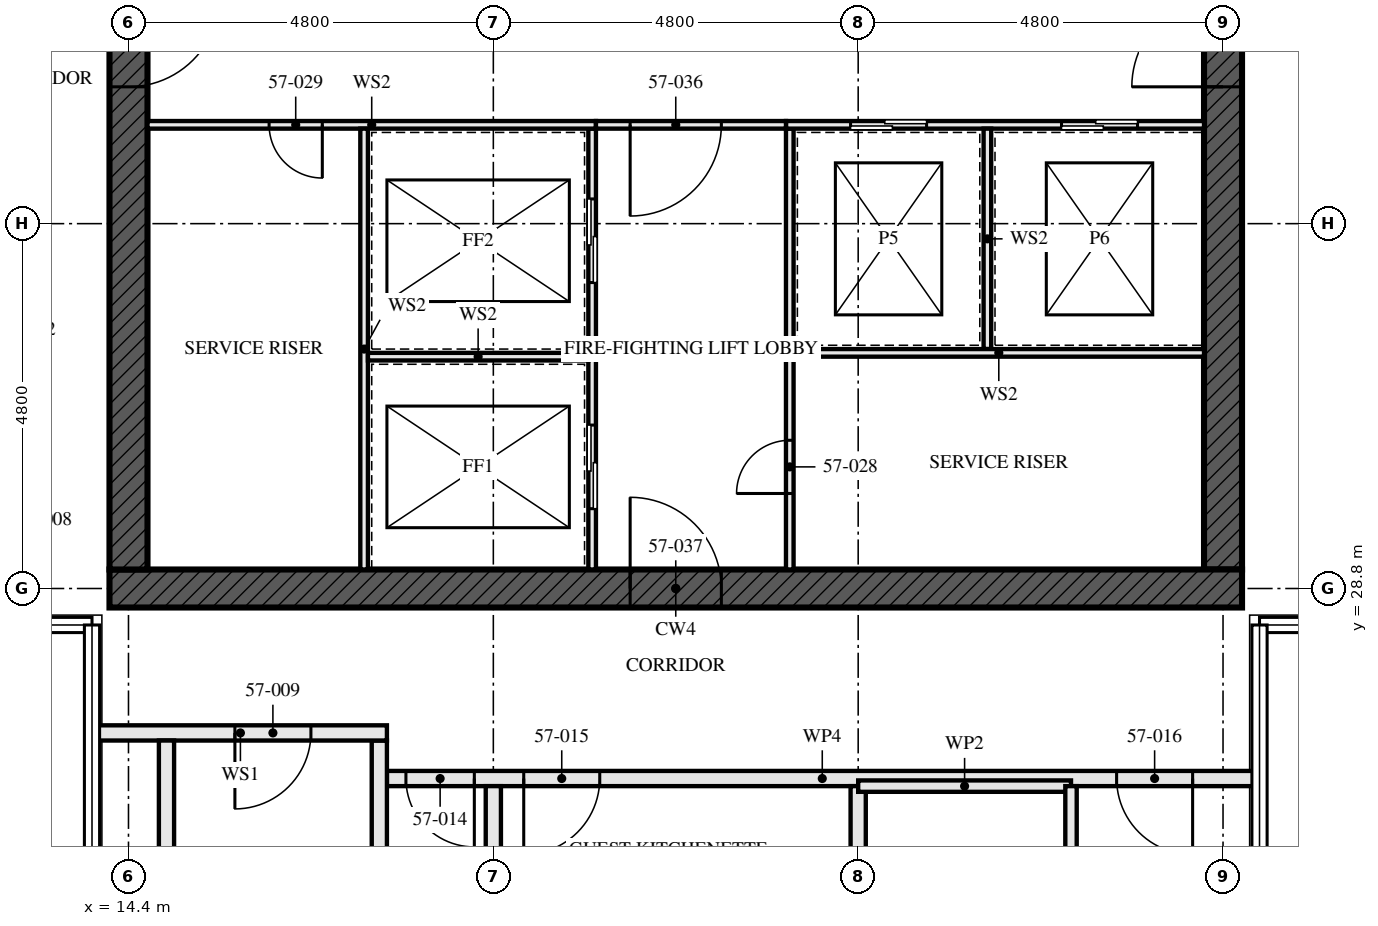
"""IFC4 building model, lengths in metres.
Left out: names, types, materials, properties, quantities, classifications, styles, units other than length and angle.
Written with IfcOpenShell. Run it as: python <this file> out.ifc"""

import sys

from ifc_helpers import new_model, si_unit, direction, frame, frame_2d, origin, place, context, subcontext, project, spatial, rectangle, extrude, element, fill, save


model = new_model("IFC4")
c1 = context("Model", 3, precision=1e-05, world=origin(), true_north=direction((0.0, 1.0)))
c2 = subcontext(c1, "Body", "Model", "MODEL_VIEW")
j1 = project(units=[si_unit("LENGTHUNIT", "METRE"), si_unit("PLANEANGLEUNIT", "RADIAN")], contexts=[c1])
p1 = place(None, origin())
s1 = spatial("IfcSite", under=j1, at=p1, CompositionType="ELEMENT")
p2 = place(p1, origin())
s2 = spatial("IfcBuilding", under=s1, at=p2, CompositionType="ELEMENT")
p3 = place(p2, frame((0.0, 0.0, 208.5)))
s3 = spatial("IfcBuildingStorey", under=s2, at=p3, CompositionType="ELEMENT", Elevation=208.5)
p4 = place(p3, frame((14.15, 28.8, -0.17), z_axis=(0.0, 0.0, 1.0), x_axis=(1.0, 0.0, 0.0)))
e1 = element("IfcWall", 1, at=p4, inside=s3, PredefinedType="SHEAR", context=c2, shape_type="SweptSolid", body=[
    extrude(rectangle(XDim=14.9, YDim=0.5, at=frame_2d((7.45, 0.0))), origin(), (0.0, 0.0, 1.0), 3.5),
])
p5 = place(p4, frame((6.85, 0.0, 0.17)))
e2 = element("IfcOpeningElement", 2, at=p5, cuts=e1, PredefinedType="OPENING", context=c2, shape_type="SweptSolid", body=[
    extrude(rectangle(XDim=1.2, YDim=2.1, at=frame_2d((0.6, 1.05))), frame((0.0, 0.26, 0.0), z_axis=(0.0, -1.0, 0.0), x_axis=(1.0, 0.0, 0.0)), (0.0, 0.0, 1.0), 0.521),
])
p6 = place(p3, frame((14.4, 42.95, -0.17), z_axis=(0.0, 0.0, 1.0), x_axis=(0.0, -1.0, 0.0)))
e3 = element("IfcWall", 3, at=p6, inside=s3, PredefinedType="SHEAR", context=c2, shape_type="SweptSolid", body=[
    extrude(rectangle(XDim=13.9, YDim=0.5, at=frame_2d((6.95, 0.0))), origin(), (0.0, 0.0, 1.0), 3.5),
])
p7 = place(p6, frame((6.35, 0.0, 0.17)))
e4 = element("IfcOpeningElement", 4, at=p7, cuts=e3, PredefinedType="OPENING", context=c2, shape_type="SweptSolid", body=[
    extrude(rectangle(XDim=1.2, YDim=2.1, at=frame_2d((0.6, 1.05))), frame((0.0, 0.26, 0.0), z_axis=(0.0, -1.0, 0.0), x_axis=(1.0, 0.0, 0.0)), (0.0, 0.0, 1.0), 0.521),
])
p8 = place(p3, frame((28.8, 29.05, -0.17), z_axis=(0.0, 0.0, 1.0), x_axis=(0.0, 1.0, 0.0)))
e5 = element("IfcWall", 5, at=p8, inside=s3, PredefinedType="SHEAR", context=c2, shape_type="SweptSolid", body=[
    extrude(rectangle(XDim=13.9, YDim=0.5, at=frame_2d((6.95, 0.0))), origin(), (0.0, 0.0, 1.0), 3.5),
])
p9 = place(p8, frame((6.35, 0.0, 0.17)))
e6 = element("IfcOpeningElement", 6, at=p9, cuts=e5, PredefinedType="OPENING", context=c2, shape_type="SweptSolid", body=[
    extrude(rectangle(XDim=1.2, YDim=2.1, at=frame_2d((0.6, 1.05))), frame((0.0, 0.26, 0.0), z_axis=(0.0, -1.0, 0.0), x_axis=(1.0, 0.0, 0.0)), (0.0, 0.0, 1.0), 0.521),
])
for number, where, z_axis, x_axis in (
    (7, (14.9, 22.1, 0.0), (0.0, 0.0, 1.0), (0.0, 1.0, 0.0)),
    (8, (17.7, 22.1, 0.0), (0.0, 0.0, 1.0), (0.0, 1.0, 0.0)),
):
    element("IfcWall", number, at=place(p3, frame(where, z_axis=z_axis, x_axis=x_axis)), inside=s3, PredefinedType="SOLIDWALL", context=c2, shape_type="SweptSolid", body=[
        extrude(rectangle(XDim=4.7, YDim=0.2, at=frame_2d((2.35, 0.0))), origin(), (0.0, 0.0, 1.0), 2.99),
    ])
p10 = place(p3, frame((13.945, 26.9, 0.0), z_axis=(0.0, 0.0, 1.0), x_axis=(1.0, 0.0, 0.0)))
e9 = element("IfcWall", 9, at=p10, inside=s3, PredefinedType="SOLIDWALL", context=c2, shape_type="SweptSolid", body=[
    extrude(rectangle(XDim=3.855, YDim=0.2, at=frame_2d((1.927, 0.0))), origin(), (0.0, 0.0, 1.0), 2.32),
])
p11 = place(p10, frame((1.855, 0.0, 0.0)))
e10 = element("IfcOpeningElement", 10, at=p11, cuts=e9, PredefinedType="OPENING", context=c2, shape_type="SweptSolid", body=[
    extrude(rectangle(XDim=1.0, YDim=2.1, at=frame_2d((0.5, 1.05))), frame((0.0, 0.111, 0.0), z_axis=(0.0, -1.0, 0.0), x_axis=(1.0, 0.0, 0.0)), (0.0, 0.0, 1.0), 0.221),
])
for number, where, z_axis, x_axis in (
    (11, (19.2, 19.52, 0.0), (0.0, 0.0, 1.0), (0.0, 1.0, 0.0)),
    (12, (24.0, 19.52, 0.0), (0.0, 0.0, 1.0), (0.0, 1.0, 0.0)),
):
    element("IfcWall", number, at=place(p3, frame(where, z_axis=z_axis, x_axis=x_axis)), inside=s3, PredefinedType="PARTITIONING", context=c2, shape_type="SweptSolid", body=[
        extrude(rectangle(XDim=6.68, YDim=0.2, at=frame_2d((3.34, 0.0))), origin(), (0.0, 0.0, 1.0), 2.55),
    ])
p12 = place(p3, frame((26.8, 23.2, 0.0), z_axis=(0.0, 0.0, 1.0), x_axis=(0.0, 1.0, 0.0)))
e13 = element("IfcWall", 13, at=p12, inside=s3, PredefinedType="PARTITIONING", context=c2, shape_type="SweptSolid", body=[
    extrude(rectangle(XDim=3.0, YDim=0.15, at=frame_2d((1.5, 0.0))), origin(), (0.0, 0.0, 1.0), 2.55),
])
p13 = place(p12, frame((1.05, 0.0, 0.0)))
e14 = element("IfcOpeningElement", 14, at=p13, cuts=e13, PredefinedType="OPENING", context=c2, shape_type="SweptSolid", body=[
    extrude(rectangle(XDim=0.9, YDim=2.1, at=frame_2d((0.45, 1.05))), frame((0.0, 0.085, 0.0), z_axis=(0.0, -1.0, 0.0), x_axis=(1.0, 0.0, 0.0)), (0.0, 0.0, 1.0), 0.171),
])
p14 = place(p3, frame((24.0, 26.2, 0.0), z_axis=(0.0, 0.0, 1.0), x_axis=(1.0, 0.0, 0.0)))
e15 = element("IfcWall", 15, at=p14, inside=s3, PredefinedType="PARTITIONING", context=c2, shape_type="SweptSolid", body=[
    extrude(rectangle(XDim=2.8, YDim=0.15, at=frame_2d((1.4, 0.0))), origin(), (0.0, 0.0, 1.0), 3.33),
])
p15 = place(p3, frame((17.8, 26.3, 0.0), z_axis=(0.0, 0.0, 1.0), x_axis=(1.0, 0.0, 0.0)))
e16 = element("IfcWall", 16, at=p15, inside=s3, PredefinedType="PARTITIONING", context=c2, shape_type="SweptSolid", body=[
    extrude(rectangle(XDim=11.455, YDim=0.2, at=frame_2d((5.728, 0.0))), origin(), (0.0, 0.0, 1.0), 2.32),
])
p16 = place(p15, frame((0.25, 0.0, 0.0)))
e17 = element("IfcOpeningElement", 17, at=p16, cuts=e16, PredefinedType="OPENING", context=c2, shape_type="SweptSolid", body=[
    extrude(rectangle(XDim=0.9, YDim=2.1, at=frame_2d((0.45, 1.05))), frame((0.0, 0.111, 0.0), z_axis=(0.0, -1.0, 0.0), x_axis=(1.0, 0.0, 0.0)), (0.0, 0.0, 1.0), 0.221),
])
p17 = place(p15, frame((1.8, 0.0, 0.0)))
e18 = element("IfcOpeningElement", 18, at=p17, cuts=e16, PredefinedType="OPENING", context=c2, shape_type="SweptSolid", body=[
    extrude(rectangle(XDim=1.0, YDim=2.1, at=frame_2d((0.5, 1.05))), frame((0.0, 0.111, 0.0), z_axis=(0.0, -1.0, 0.0), x_axis=(1.0, 0.0, 0.0)), (0.0, 0.0, 1.0), 0.221),
])
p18 = place(p15, frame((9.6, 0.0, 0.0)))
e19 = element("IfcOpeningElement", 19, at=p18, cuts=e16, PredefinedType="OPENING", context=c2, shape_type="SweptSolid", body=[
    extrude(rectangle(XDim=1.0, YDim=2.1, at=frame_2d((0.5, 1.05))), frame((0.0, 0.111, 0.0), z_axis=(0.0, -1.0, 0.0), x_axis=(1.0, 0.0, 0.0)), (0.0, 0.0, 1.0), 0.221),
])
p19 = place(p3, frame((20.5, 29.05, 0.0), z_axis=(0.0, 0.0, 1.0), x_axis=(0.0, 1.0, 0.0)))
e20 = element("IfcWall", 20, at=p19, inside=s3, PredefinedType="SOLIDWALL", context=c2, shape_type="SweptSolid", body=[
    extrude(rectangle(XDim=5.8, YDim=0.1, at=frame_2d((2.9, 0.0))), origin(), (0.0, 0.0, 1.0), 3.33),
])
p20 = place(p19, frame((0.8, 0.0, 0.0)))
e21 = element("IfcOpeningElement", 21, at=p20, cuts=e20, PredefinedType="OPENING", context=c2, shape_type="SweptSolid", body=[
    extrude(rectangle(XDim=1.1, YDim=2.3, at=frame_2d((0.55, 1.15))), frame((0.0, 0.061, 0.0), z_axis=(0.0, -1.0, 0.0), x_axis=(1.0, 0.0, 0.0)), (0.0, 0.0, 1.0), 0.121),
])
p21 = place(p19, frame((3.775, 0.0, 0.0)))
e22 = element("IfcOpeningElement", 22, at=p21, cuts=e20, PredefinedType="OPENING", context=c2, shape_type="SweptSolid", body=[
    extrude(rectangle(XDim=1.1, YDim=2.3, at=frame_2d((0.55, 1.15))), frame((0.0, 0.061, 0.0), z_axis=(0.0, -1.0, 0.0), x_axis=(1.0, 0.0, 0.0)), (0.0, 0.0, 1.0), 0.121),
])
p22 = place(p3, frame((23.1, 29.05, 0.0), z_axis=(0.0, 0.0, 1.0), x_axis=(0.0, 1.0, 0.0)))
e23 = element("IfcWall", 23, at=p22, inside=s3, PredefinedType="SOLIDWALL", context=c2, shape_type="SweptSolid", body=[
    extrude(rectangle(XDim=5.8, YDim=0.1, at=frame_2d((2.9, 0.0))), origin(), (0.0, 0.0, 1.0), 3.33),
])
p23 = place(p22, frame((1.0, 0.0, 0.0)))
e24 = element("IfcOpeningElement", 24, at=p23, cuts=e23, PredefinedType="OPENING", context=c2, shape_type="SweptSolid", body=[
    extrude(rectangle(XDim=0.7, YDim=2.1, at=frame_2d((0.35, 1.05))), frame((0.0, 0.061, 0.0), z_axis=(0.0, -1.0, 0.0), x_axis=(1.0, 0.0, 0.0)), (0.0, 0.0, 1.0), 0.121),
])
p24 = place(p3, frame((14.65, 34.9, 0.0), z_axis=(0.0, 0.0, 1.0), x_axis=(1.0, 0.0, 0.0)))
e25 = element("IfcWall", 25, at=p24, inside=s3, PredefinedType="SOLIDWALL", context=c2, shape_type="SweptSolid", body=[
    extrude(rectangle(XDim=5.9, YDim=0.1, at=frame_2d((2.95, 0.0))), origin(), (0.0, 0.0, 1.0), 3.33),
])
p25 = place(p24, frame((1.6, 0.0, 0.0)))
e26 = element("IfcOpeningElement", 26, at=p25, cuts=e25, PredefinedType="OPENING", context=c2, shape_type="SweptSolid", body=[
    extrude(rectangle(XDim=0.7, YDim=2.1, at=frame_2d((0.35, 1.05))), frame((0.0, 0.061, 0.0), z_axis=(0.0, -1.0, 0.0), x_axis=(1.0, 0.0, 0.0)), (0.0, 0.0, 1.0), 0.121),
])
p26 = place(p3, frame((23.05, 34.9, 0.0), z_axis=(0.0, 0.0, 1.0), x_axis=(1.0, 0.0, 0.0)))
e27 = element("IfcWall", 27, at=p26, inside=s3, PredefinedType="SOLIDWALL", context=c2, shape_type="SweptSolid", body=[
    extrude(rectangle(XDim=5.5, YDim=0.1, at=frame_2d((2.75, 0.0))), origin(), (0.0, 0.0, 1.0), 3.33),
])
p27 = place(p26, frame((0.85, 0.0, 0.0)))
e28 = element("IfcOpeningElement", 28, at=p27, cuts=e27, PredefinedType="OPENING", context=c2, shape_type="SweptSolid", body=[
    extrude(rectangle(XDim=1.0, YDim=2.1, at=frame_2d((0.5, 1.05))), frame((0.0, 0.061, 0.0), z_axis=(0.0, -1.0, 0.0), x_axis=(1.0, 0.0, 0.0)), (0.0, 0.0, 1.0), 0.121),
])
p28 = place(p26, frame((3.625, 0.0, 0.0)))
e29 = element("IfcOpeningElement", 29, at=p28, cuts=e27, PredefinedType="OPENING", context=c2, shape_type="SweptSolid", body=[
    extrude(rectangle(XDim=1.0, YDim=2.1, at=frame_2d((0.5, 1.05))), frame((0.0, 0.061, 0.0), z_axis=(0.0, -1.0, 0.0), x_axis=(1.0, 0.0, 0.0)), (0.0, 0.0, 1.0), 0.121),
])
p29 = place(p3, frame((20.55, 34.9, 0.0), z_axis=(0.0, 0.0, 1.0), x_axis=(1.0, 0.0, 0.0)))
e30 = element("IfcWall", 30, at=p29, inside=s3, PredefinedType="SOLIDWALL", context=c2, shape_type="SweptSolid", body=[
    extrude(rectangle(XDim=2.5, YDim=0.1, at=frame_2d((1.25, 0.0))), origin(), (0.0, 0.0, 1.0), 3.33),
])
p30 = place(p29, frame((0.45, 0.0, 0.0)))
e31 = element("IfcOpeningElement", 31, at=p30, cuts=e30, PredefinedType="OPENING", context=c2, shape_type="SweptSolid", body=[
    extrude(rectangle(XDim=1.2, YDim=2.1, at=frame_2d((0.6, 1.05))), frame((0.0, 0.061, 0.0), z_axis=(0.0, -1.0, 0.0), x_axis=(1.0, 0.0, 0.0)), (0.0, 0.0, 1.0), 0.121),
])
p31 = place(p3, frame((17.5, 29.05, 0.0), z_axis=(0.0, 0.0, 1.0), x_axis=(0.0, 1.0, 0.0)))
e32 = element("IfcWall", 32, at=p31, inside=s3, PredefinedType="SOLIDWALL", context=c2, shape_type="SweptSolid", body=[
    extrude(rectangle(XDim=5.8, YDim=0.1, at=frame_2d((2.9, 0.0))), origin(), (0.0, 0.0, 1.0), 3.33),
])
p32 = place(p3, frame((17.55, 31.85, 0.0), z_axis=(0.0, 0.0, 1.0), x_axis=(1.0, 0.0, 0.0)))
e33 = element("IfcWall", 33, at=p32, inside=s3, PredefinedType="SOLIDWALL", context=c2, shape_type="SweptSolid", body=[
    extrude(rectangle(XDim=2.9, YDim=0.1, at=frame_2d((1.45, 0.0))), origin(), (0.0, 0.0, 1.0), 3.33),
])
p33 = place(p3, frame((25.7, 31.95, 0.0), z_axis=(0.0, 0.0, 1.0), x_axis=(0.0, 1.0, 0.0)))
e34 = element("IfcWall", 34, at=p33, inside=s3, PredefinedType="SOLIDWALL", context=c2, shape_type="SweptSolid", body=[
    extrude(rectangle(XDim=2.9, YDim=0.1, at=frame_2d((1.45, 0.0))), origin(), (0.0, 0.0, 1.0), 3.33),
])
p34 = place(p3, frame((23.15, 31.9, 0.0), z_axis=(0.0, 0.0, 1.0), x_axis=(1.0, 0.0, 0.0)))
e35 = element("IfcWall", 35, at=p34, inside=s3, PredefinedType="SOLIDWALL", context=c2, shape_type="SweptSolid", body=[
    extrude(rectangle(XDim=5.4, YDim=0.1, at=frame_2d((2.7, 0.0))), origin(), (0.0, 0.0, 1.0), 3.33),
])
p35 = place(p11, frame((1.0, 0.0, 0.0), z_axis=(0.0, 0.0, 1.0), x_axis=(-1.0, 0.0, 0.0)))
e36 = element("IfcDoor", 36, at=p35, inside=s3, OperationType="SINGLE_SWING_LEFT", PredefinedType="DOOR", context=c2, shape_type="SweptSolid", body=[
    extrude(rectangle(XDim=1.0, YDim=2.1, at=frame_2d((0.5, 1.05))), frame((0.0, 0.032, 0.0), z_axis=(0.0, -1.0, 0.0), x_axis=(1.0, 0.0, 0.0)), (0.0, 0.0, 1.0), 0.064),
])
fill(e10, e36)
p36 = place(p16, frame((0.9, 0.0, 0.0), z_axis=(0.0, 0.0, 1.0), x_axis=(-1.0, 0.0, 0.0)))
e37 = element("IfcDoor", 37, at=p36, inside=s3, OperationType="SINGLE_SWING_RIGHT", PredefinedType="DOOR", context=c2, shape_type="SweptSolid", body=[
    extrude(rectangle(XDim=0.9, YDim=2.1, at=frame_2d((0.45, 1.05))), frame((0.0, 0.027, 0.0), z_axis=(0.0, -1.0, 0.0), x_axis=(1.0, 0.0, 0.0)), (0.0, 0.0, 1.0), 0.054),
])
fill(e17, e37)
p37 = place(p17, frame((1.0, 0.0, 0.0), z_axis=(0.0, 0.0, 1.0), x_axis=(-1.0, 0.0, 0.0)))
e38 = element("IfcDoor", 38, at=p37, inside=s3, OperationType="SINGLE_SWING_LEFT", PredefinedType="DOOR", context=c2, shape_type="SweptSolid", body=[
    extrude(rectangle(XDim=1.0, YDim=2.1, at=frame_2d((0.5, 1.05))), frame((0.0, 0.027, 0.0), z_axis=(0.0, -1.0, 0.0), x_axis=(1.0, 0.0, 0.0)), (0.0, 0.0, 1.0), 0.054),
])
fill(e18, e38)
p38 = place(p18, frame((1.0, 0.0, 0.0), z_axis=(0.0, 0.0, 1.0), x_axis=(-1.0, 0.0, 0.0)))
e39 = element("IfcDoor", 39, at=p38, inside=s3, OperationType="SINGLE_SWING_RIGHT", PredefinedType="DOOR", context=c2, shape_type="SweptSolid", body=[
    extrude(rectangle(XDim=1.0, YDim=2.1, at=frame_2d((0.5, 1.05))), frame((0.0, 0.027, 0.0), z_axis=(0.0, -1.0, 0.0), x_axis=(1.0, 0.0, 0.0)), (0.0, 0.0, 1.0), 0.054),
])
fill(e19, e39)
p39 = place(p20, origin())
e40 = element("IfcDoor", 40, at=p39, inside=s3, OperationType="SLIDING_TO_LEFT", PredefinedType="DOOR", context=c2, shape_type="SweptSolid", body=[
    extrude(rectangle(XDim=1.1, YDim=2.3, at=frame_2d((0.55, 1.15))), frame((0.0, 0.05, 0.0), z_axis=(0.0, -1.0, 0.0), x_axis=(1.0, 0.0, 0.0)), (0.0, 0.0, 1.0), 0.1),
])
fill(e21, e40)
p40 = place(p21, origin())
e41 = element("IfcDoor", 41, at=p40, inside=s3, OperationType="SLIDING_TO_LEFT", PredefinedType="DOOR", context=c2, shape_type="SweptSolid", body=[
    extrude(rectangle(XDim=1.1, YDim=2.3, at=frame_2d((0.55, 1.15))), frame((0.0, 0.05, 0.0), z_axis=(0.0, -1.0, 0.0), x_axis=(1.0, 0.0, 0.0)), (0.0, 0.0, 1.0), 0.1),
])
fill(e22, e41)
p41 = place(p23, origin())
e42 = element("IfcDoor", 42, at=p41, inside=s3, OperationType="SINGLE_SWING_RIGHT", PredefinedType="DOOR", context=c2, shape_type="SweptSolid", body=[
    extrude(rectangle(XDim=0.7, YDim=2.1, at=frame_2d((0.35, 1.05))), frame((0.0, 0.027, 0.0), z_axis=(0.0, -1.0, 0.0), x_axis=(1.0, 0.0, 0.0)), (0.0, 0.0, 1.0), 0.054),
])
fill(e24, e42)
p42 = place(p25, frame((0.7, 0.0, 0.0), z_axis=(0.0, 0.0, 1.0), x_axis=(-1.0, 0.0, 0.0)))
e43 = element("IfcDoor", 43, at=p42, inside=s3, OperationType="SINGLE_SWING_RIGHT", PredefinedType="DOOR", context=c2, shape_type="SweptSolid", body=[
    extrude(rectangle(XDim=0.7, YDim=2.1, at=frame_2d((0.35, 1.05))), frame((0.0, 0.027, 0.0), z_axis=(0.0, -1.0, 0.0), x_axis=(1.0, 0.0, 0.0)), (0.0, 0.0, 1.0), 0.054),
])
fill(e26, e43)
p43 = place(p27, origin())
e44 = element("IfcDoor", 44, at=p43, inside=s3, OperationType="SLIDING_TO_LEFT", PredefinedType="DOOR", context=c2, shape_type="SweptSolid", body=[
    extrude(rectangle(XDim=1.0, YDim=2.1, at=frame_2d((0.5, 1.05))), frame((0.0, 0.05, 0.0), z_axis=(0.0, -1.0, 0.0), x_axis=(1.0, 0.0, 0.0)), (0.0, 0.0, 1.0), 0.1),
])
fill(e28, e44)
p44 = place(p28, origin())
e45 = element("IfcDoor", 45, at=p44, inside=s3, OperationType="SLIDING_TO_LEFT", PredefinedType="DOOR", context=c2, shape_type="SweptSolid", body=[
    extrude(rectangle(XDim=1.0, YDim=2.1, at=frame_2d((0.5, 1.05))), frame((0.0, 0.05, 0.0), z_axis=(0.0, -1.0, 0.0), x_axis=(1.0, 0.0, 0.0)), (0.0, 0.0, 1.0), 0.1),
])
fill(e29, e45)
p45 = place(p30, frame((1.2, 0.0, 0.0), z_axis=(0.0, 0.0, 1.0), x_axis=(-1.0, 0.0, 0.0)))
e46 = element("IfcDoor", 46, at=p45, inside=s3, OperationType="SINGLE_SWING_LEFT", PredefinedType="DOOR", context=c2, shape_type="SweptSolid", body=[
    extrude(rectangle(XDim=1.2, YDim=2.1, at=frame_2d((0.6, 1.05))), frame((0.0, 0.027, 0.0), z_axis=(0.0, -1.0, 0.0), x_axis=(1.0, 0.0, 0.0)), (0.0, 0.0, 1.0), 0.054),
])
fill(e31, e46)
p46 = place(p5, origin())
e47 = element("IfcDoor", 47, at=p46, inside=s3, OperationType="SINGLE_SWING_LEFT", PredefinedType="DOOR", context=c2, shape_type="SweptSolid", body=[
    extrude(rectangle(XDim=1.2, YDim=2.1, at=frame_2d((0.6, 1.05))), frame((0.0, 0.027, 0.0), z_axis=(0.0, -1.0, 0.0), x_axis=(1.0, 0.0, 0.0)), (0.0, 0.0, 1.0), 0.054),
])
fill(e2, e47)
p47 = place(p7, origin())
e48 = element("IfcDoor", 48, at=p47, inside=s3, OperationType="SINGLE_SWING_LEFT", PredefinedType="DOOR", context=c2, shape_type="SweptSolid", body=[
    extrude(rectangle(XDim=1.2, YDim=2.1, at=frame_2d((0.6, 1.05))), frame((0.0, 0.027, 0.0), z_axis=(0.0, -1.0, 0.0), x_axis=(1.0, 0.0, 0.0)), (0.0, 0.0, 1.0), 0.054),
])
fill(e4, e48)
p48 = place(p9, origin())
e49 = element("IfcDoor", 49, at=p48, inside=s3, OperationType="SINGLE_SWING_LEFT", PredefinedType="DOOR", context=c2, shape_type="SweptSolid", body=[
    extrude(rectangle(XDim=1.2, YDim=2.1, at=frame_2d((0.6, 1.05))), frame((0.0, 0.027, 0.0), z_axis=(0.0, -1.0, 0.0), x_axis=(1.0, 0.0, 0.0)), (0.0, 0.0, 1.0), 0.054),
])
fill(e6, e49)
save(model, sys.argv[1])
